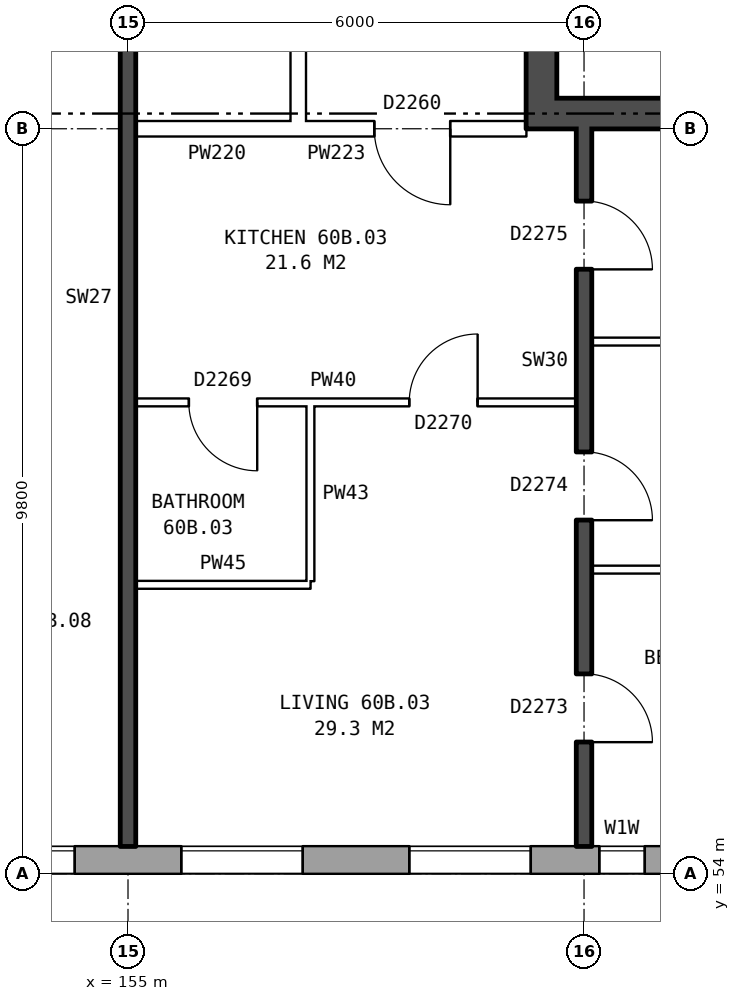
"""IFC4 building model, lengths in metres.
Left out: names, types, materials, properties, quantities, classifications, styles, units other than length and angle.
Written with IfcOpenShell. Run it as: python <this file> out.ifc"""

import sys

from ifc_helpers import new_model, si_unit, direction, frame, frame_2d, origin, place, context, subcontext, project, spatial, rectangle, extrude, element, fill, save


model = new_model("IFC4")
c1 = context("Model", 3, precision=1e-05, world=origin(), true_north=direction((0.0, 1.0)))
c2 = subcontext(c1, "Body", "Model", "MODEL_VIEW")
j1 = project(units=[si_unit("LENGTHUNIT", "METRE"), si_unit("PLANEANGLEUNIT", "RADIAN")], contexts=[c1])
p1 = place(None, origin())
s1 = spatial("IfcSite", under=j1, at=p1, CompositionType="ELEMENT")
p2 = place(p1, origin())
s2 = spatial("IfcBuilding", under=s1, at=p2, CompositionType="ELEMENT")
p3 = place(p2, frame((0.0, 0.0, 212.1)))
s3 = spatial("IfcBuildingStorey", under=s2, at=p3, CompositionType="ELEMENT", Elevation=212.1)
p4 = place(p3, frame((132.05, 54.18, 0.0), z_axis=(0.0, 0.0, 1.0), x_axis=(1.0, 0.0, 0.0)))
e1 = element("IfcWall", 1, at=p4, inside=s3, PredefinedType="STANDARD", context=c2, shape_type="SweptSolid", body=[
    extrude(rectangle(XDim=33.875, YDim=0.36, at=frame_2d((16.938, 0.0))), origin(), (0.0, 0.0, 1.0), 2.85),
])
p5 = place(p4, frame((2.65, 0.0, 0.8)))
e2 = element("IfcOpeningElement", 2, at=p5, cuts=e1, PredefinedType="OPENING", context=c2, shape_type="SweptSolid", body=[
    extrude(rectangle(XDim=1.6, YDim=1.8, at=frame_2d((0.8, 0.9))), frame((0.0, 0.19, 0.0), z_axis=(0.0, -1.0, 0.0), x_axis=(1.0, 0.0, 0.0)), (0.0, 0.0, 1.0), 0.38),
])
p6 = place(p4, frame((6.6, 0.0, 0.8)))
e3 = element("IfcOpeningElement", 3, at=p6, cuts=e1, PredefinedType="OPENING", context=c2, shape_type="SweptSolid", body=[
    extrude(rectangle(XDim=1.6, YDim=1.8, at=frame_2d((0.8, 0.9))), frame((0.0, 0.19, 0.0), z_axis=(0.0, -1.0, 0.0), x_axis=(1.0, 0.0, 0.0)), (0.0, 0.0, 1.0), 0.38),
])
p7 = place(p4, frame((8.65, 0.0, 0.8)))
e4 = element("IfcOpeningElement", 4, at=p7, cuts=e1, PredefinedType="OPENING", context=c2, shape_type="SweptSolid", body=[
    extrude(rectangle(XDim=1.6, YDim=1.8, at=frame_2d((0.8, 0.9))), frame((0.0, 0.19, 0.0), z_axis=(0.0, -1.0, 0.0), x_axis=(1.0, 0.0, 0.0)), (0.0, 0.0, 1.0), 0.38),
])
p8 = place(p4, frame((11.65, 0.0, 0.8)))
e5 = element("IfcOpeningElement", 5, at=p8, cuts=e1, PredefinedType="OPENING", context=c2, shape_type="SweptSolid", body=[
    extrude(rectangle(XDim=1.6, YDim=1.8, at=frame_2d((0.8, 0.9))), frame((0.0, 0.19, 0.0), z_axis=(0.0, -1.0, 0.0), x_axis=(1.0, 0.0, 0.0)), (0.0, 0.0, 1.0), 0.38),
])
p9 = place(p4, frame((14.65, 0.0, 0.8)))
e6 = element("IfcOpeningElement", 6, at=p9, cuts=e1, PredefinedType="OPENING", context=c2, shape_type="SweptSolid", body=[
    extrude(rectangle(XDim=1.6, YDim=1.8, at=frame_2d((0.8, 0.9))), frame((0.0, 0.19, 0.0), z_axis=(0.0, -1.0, 0.0), x_axis=(1.0, 0.0, 0.0)), (0.0, 0.0, 1.0), 0.38),
])
p10 = place(p4, frame((17.65, 0.0, 0.8)))
e7 = element("IfcOpeningElement", 7, at=p10, cuts=e1, PredefinedType="OPENING", context=c2, shape_type="SweptSolid", body=[
    extrude(rectangle(XDim=1.6, YDim=1.8, at=frame_2d((0.8, 0.9))), frame((0.0, 0.19, 0.0), z_axis=(0.0, -1.0, 0.0), x_axis=(1.0, 0.0, 0.0)), (0.0, 0.0, 1.0), 0.38),
])
p11 = place(p4, frame((20.65, 0.0, 0.8)))
e8 = element("IfcOpeningElement", 8, at=p11, cuts=e1, PredefinedType="OPENING", context=c2, shape_type="SweptSolid", body=[
    extrude(rectangle(XDim=1.6, YDim=1.8, at=frame_2d((0.8, 0.9))), frame((0.0, 0.19, 0.0), z_axis=(0.0, -1.0, 0.0), x_axis=(1.0, 0.0, 0.0)), (0.0, 0.0, 1.0), 0.38),
])
p12 = place(p4, frame((23.65, 0.0, 0.8)))
e9 = element("IfcOpeningElement", 9, at=p12, cuts=e1, PredefinedType="OPENING", context=c2, shape_type="SweptSolid", body=[
    extrude(rectangle(XDim=1.6, YDim=1.8, at=frame_2d((0.8, 0.9))), frame((0.0, 0.19, 0.0), z_axis=(0.0, -1.0, 0.0), x_axis=(1.0, 0.0, 0.0)), (0.0, 0.0, 1.0), 0.38),
])
p13 = place(p4, frame((26.65, 0.0, 0.8)))
e10 = element("IfcOpeningElement", 10, at=p13, cuts=e1, PredefinedType="OPENING", context=c2, shape_type="SweptSolid", body=[
    extrude(rectangle(XDim=1.6, YDim=1.8, at=frame_2d((0.8, 0.9))), frame((0.0, 0.19, 0.0), z_axis=(0.0, -1.0, 0.0), x_axis=(1.0, 0.0, 0.0)), (0.0, 0.0, 1.0), 0.38),
])
p14 = place(p4, frame((29.15, 0.0, 0.8)))
e11 = element("IfcOpeningElement", 11, at=p14, cuts=e1, PredefinedType="OPENING", context=c2, shape_type="SweptSolid", body=[
    extrude(rectangle(XDim=0.6, YDim=0.9, at=frame_2d((0.3, 0.45))), frame((0.0, 0.19, 0.0), z_axis=(0.0, -1.0, 0.0), x_axis=(1.0, 0.0, 0.0)), (0.0, 0.0, 1.0), 0.38),
])
p15 = place(p4, frame((31.25, 0.0, 1.1)))
e12 = element("IfcOpeningElement", 12, at=p15, cuts=e1, PredefinedType="OPENING", context=c2, shape_type="SweptSolid", body=[
    extrude(rectangle(XDim=1.4, YDim=1.5, at=frame_2d((0.7, 0.75))), frame((0.0, 0.19, 0.0), z_axis=(0.0, -1.0, 0.0), x_axis=(1.0, 0.0, 0.0)), (0.0, 0.0, 1.0), 0.38),
])
p16 = place(p4, frame((32.95, 0.0, 0.8)))
e13 = element("IfcOpeningElement", 13, at=p16, cuts=e1, PredefinedType="OPENING", context=c2, shape_type="SweptSolid", body=[
    extrude(rectangle(XDim=0.6, YDim=1.8, at=frame_2d((0.3, 0.9))), frame((0.0, 0.19, 0.0), z_axis=(0.0, -1.0, 0.0), x_axis=(1.0, 0.0, 0.0)), (0.0, 0.0, 1.0), 0.38),
])
p17 = place(p3, frame((160.44, 76.2, 0.0), z_axis=(0.0, 0.0, 1.0), x_axis=(0.0, -1.0, 0.0)))
e14 = element("IfcWall", 14, at=p17, inside=s3, PredefinedType="SHEAR", context=c2, shape_type="SweptSolid", body=[
    extrude(rectangle(XDim=12.4, YDim=0.4, at=frame_2d((6.2, 0.0))), origin(), (0.0, 0.0, 1.0), 2.85),
])
p18 = place(p17, frame((1.325, 0.0, 0.0)))
e15 = element("IfcOpeningElement", 15, at=p18, cuts=e14, PredefinedType="OPENING", context=c2, shape_type="SweptSolid", body=[
    extrude(rectangle(XDim=1.1, YDim=2.1, at=frame_2d((0.55, 1.05))), frame((0.0, 0.21, 0.0), z_axis=(0.0, -1.0, 0.0), x_axis=(1.0, 0.0, 0.0)), (0.0, 0.0, 1.0), 0.42),
])
p19 = place(p17, frame((3.825, 0.0, 0.0)))
e16 = element("IfcOpeningElement", 16, at=p19, cuts=e14, PredefinedType="OPENING", context=c2, shape_type="SweptSolid", body=[
    extrude(rectangle(XDim=0.85, YDim=2.1, at=frame_2d((0.425, 1.05))), frame((0.0, 0.21, 0.0), z_axis=(0.0, -1.0, 0.0), x_axis=(1.0, 0.0, 0.0)), (0.0, 0.0, 1.0), 0.42),
])
p20 = place(p17, frame((5.975, 0.0, 0.0)))
e17 = element("IfcOpeningElement", 17, at=p20, cuts=e14, PredefinedType="OPENING", context=c2, shape_type="SweptSolid", body=[
    extrude(rectangle(XDim=0.85, YDim=2.1, at=frame_2d((0.425, 1.05))), frame((0.0, 0.21, 0.0), z_axis=(0.0, -1.0, 0.0), x_axis=(1.0, 0.0, 0.0)), (0.0, 0.0, 1.0), 0.42),
])
p21 = place(p17, frame((9.9, 0.0, 0.0)))
e18 = element("IfcOpeningElement", 18, at=p21, cuts=e14, PredefinedType="OPENING", context=c2, shape_type="SweptSolid", body=[
    extrude(rectangle(XDim=1.1, YDim=2.1, at=frame_2d((0.55, 1.05))), frame((0.0, 0.21, 0.0), z_axis=(0.0, -1.0, 0.0), x_axis=(1.0, 0.0, 0.0)), (0.0, 0.0, 1.0), 0.42),
])
p22 = place(p17, frame((8.125, 0.0, 0.0)))
e19 = element("IfcOpeningElement", 19, at=p22, cuts=e14, PredefinedType="OPENING", context=c2, shape_type="SweptSolid", body=[
    extrude(rectangle(XDim=0.85, YDim=2.1, at=frame_2d((0.425, 1.05))), frame((0.0, 0.21, 0.0), z_axis=(0.0, -1.0, 0.0), x_axis=(1.0, 0.0, 0.0)), (0.0, 0.0, 1.0), 0.42),
])
p23 = place(p3, frame((160.64, 64.0, 0.0), z_axis=(0.0, 0.0, 1.0), x_axis=(1.0, 0.0, 0.0)))
e20 = element("IfcWall", 20, at=p23, inside=s3, PredefinedType="SHEAR", context=c2, shape_type="SweptSolid", body=[
    extrude(rectangle(XDim=7.6, YDim=0.4, at=frame_2d((3.8, 0.0))), origin(), (0.0, 0.0, 1.0), 2.85),
])
p24 = place(p3, frame((157.24, 63.9, 0.0), z_axis=(0.0, 0.0, 1.0), x_axis=(0.0, 1.0, 0.0)))
e21 = element("IfcWall", 21, at=p24, inside=s3, PredefinedType="PARTITIONING", context=c2, shape_type="SweptSolid", body=[
    extrude(rectangle(XDim=12.2, YDim=0.2, at=frame_2d((6.1, 0.0))), origin(), (0.0, 0.0, 1.0), 2.85),
])
p25 = place(p24, frame((5.1, 0.0, 0.0)))
e22 = element("IfcOpeningElement", 22, at=p25, cuts=e21, PredefinedType="OPENING", context=c2, shape_type="SweptSolid", body=[
    extrude(rectangle(XDim=2.0, YDim=2.1, at=frame_2d((1.0, 1.05))), frame((0.0, 0.11, 0.0), z_axis=(0.0, -1.0, 0.0), x_axis=(1.0, 0.0, 0.0)), (0.0, 0.0, 1.0), 0.22),
])
p26 = place(p3, frame((155.1, 57.8, 0.0), z_axis=(0.0, 0.0, 1.0), x_axis=(1.0, 0.0, 0.0)))
e23 = element("IfcWall", 23, at=p26, inside=s3, PredefinedType="PARTITIONING", context=c2, shape_type="SweptSolid", body=[
    extrude(rectangle(XDim=2.3, YDim=0.1, at=frame_2d((1.15, 0.0))), origin(), (0.0, 0.0, 1.0), 2.85),
])
p27 = place(p3, frame((161.1, 58.0, 0.0), z_axis=(0.0, 0.0, 1.0), x_axis=(1.0, 0.0, 0.0)))
e24 = element("IfcWall", 24, at=p27, inside=s3, PredefinedType="PARTITIONING", context=c2, shape_type="SweptSolid", body=[
    extrude(rectangle(XDim=7.54, YDim=0.1, at=frame_2d((3.77, 0.0))), origin(), (0.0, 0.0, 1.0), 2.85),
])
p28 = place(p3, frame((155.1, 60.2, 0.0), z_axis=(0.0, 0.0, 1.0), x_axis=(1.0, 0.0, 0.0)))
e25 = element("IfcWall", 25, at=p28, inside=s3, PredefinedType="PARTITIONING", context=c2, shape_type="SweptSolid", body=[
    extrude(rectangle(XDim=5.8, YDim=0.1, at=frame_2d((2.9, 0.0))), origin(), (0.0, 0.0, 1.0), 2.85),
])
p29 = place(p28, frame((3.6, 0.0, 0.0)))
e26 = element("IfcOpeningElement", 26, at=p29, cuts=e25, PredefinedType="OPENING", context=c2, shape_type="SweptSolid", body=[
    extrude(rectangle(XDim=0.9, YDim=2.1, at=frame_2d((0.45, 1.05))), frame((0.0, 0.06, 0.0), z_axis=(0.0, -1.0, 0.0), x_axis=(1.0, 0.0, 0.0)), (0.0, 0.0, 1.0), 0.12),
])
p30 = place(p28, frame((0.7, 0.0, 0.0)))
e27 = element("IfcOpeningElement", 27, at=p30, cuts=e25, PredefinedType="OPENING", context=c2, shape_type="SweptSolid", body=[
    extrude(rectangle(XDim=0.9, YDim=2.1, at=frame_2d((0.45, 1.05))), frame((0.0, 0.06, 0.0), z_axis=(0.0, -1.0, 0.0), x_axis=(1.0, 0.0, 0.0)), (0.0, 0.0, 1.0), 0.12),
])
p31 = place(p3, frame((161.1, 61.0, 0.0), z_axis=(0.0, 0.0, 1.0), x_axis=(1.0, 0.0, 0.0)))
e28 = element("IfcWall", 28, at=p31, inside=s3, PredefinedType="PARTITIONING", context=c2, shape_type="SweptSolid", body=[
    extrude(rectangle(XDim=7.54, YDim=0.1, at=frame_2d((3.77, 0.0))), origin(), (0.0, 0.0, 1.0), 2.85),
])
p32 = place(p3, frame((155.1, 63.8, 0.0), z_axis=(0.0, 0.0, 1.0), x_axis=(1.0, 0.0, 0.0)))
e29 = element("IfcWall", 29, at=p32, inside=s3, PredefinedType="PARTITIONING", context=c2, shape_type="SweptSolid", body=[
    extrude(rectangle(XDim=2.14, YDim=0.2, at=frame_2d((1.07, 0.0))), origin(), (0.0, 0.0, 1.0), 2.85),
])
p33 = place(p3, frame((157.24, 63.8, 0.0), z_axis=(0.0, 0.0, 1.0), x_axis=(1.0, 0.0, 0.0)))
e30 = element("IfcWall", 30, at=p33, inside=s3, PredefinedType="PARTITIONING", context=c2, shape_type="SweptSolid", body=[
    extrude(rectangle(XDim=3.0, YDim=0.2, at=frame_2d((1.5, 0.0))), origin(), (0.0, 0.0, 1.0), 2.85),
])
p34 = place(p33, frame((1.0, 0.0, 0.0)))
e31 = element("IfcOpeningElement", 31, at=p34, cuts=e30, PredefinedType="OPENING", context=c2, shape_type="SweptSolid", body=[
    extrude(rectangle(XDim=1.0, YDim=2.1, at=frame_2d((0.5, 1.05))), frame((0.0, 0.11, 0.0), z_axis=(0.0, -1.0, 0.0), x_axis=(1.0, 0.0, 0.0)), (0.0, 0.0, 1.0), 0.22),
])
p35 = place(p3, frame((155.0, 54.36, 0.0), z_axis=(0.0, 0.0, 1.0), x_axis=(0.0, 1.0, 0.0)))
e32 = element("IfcWall", 32, at=p35, inside=s3, PredefinedType="SOLIDWALL", context=c2, shape_type="SweptSolid", body=[
    extrude(rectangle(XDim=14.44, YDim=0.2, at=frame_2d((7.22, 0.0))), origin(), (0.0, 0.0, 1.0), 2.85),
])
p36 = place(p3, frame((157.4, 57.85, 0.0), z_axis=(0.0, 0.0, 1.0), x_axis=(0.0, 1.0, 0.0)))
e33 = element("IfcWall", 33, at=p36, inside=s3, PredefinedType="PARTITIONING", context=c2, shape_type="SweptSolid", body=[
    extrude(rectangle(XDim=2.3, YDim=0.1, at=frame_2d((1.15, 0.0))), origin(), (0.0, 0.0, 1.0), 2.85),
])
p37 = place(p3, frame((161.0, 54.36, 0.0), z_axis=(0.0, 0.0, 1.0), x_axis=(0.0, 1.0, 0.0)))
e34 = element("IfcWall", 34, at=p37, inside=s3, PredefinedType="SOLIDWALL", context=c2, shape_type="SweptSolid", body=[
    extrude(rectangle(XDim=9.44, YDim=0.2, at=frame_2d((4.72, 0.0))), origin(), (0.0, 0.0, 1.0), 2.85),
])
p38 = place(p37, frame((1.37, 0.0, 0.0)))
e35 = element("IfcOpeningElement", 35, at=p38, cuts=e34, PredefinedType="OPENING", context=c2, shape_type="SweptSolid", body=[
    extrude(rectangle(XDim=0.9, YDim=2.1, at=frame_2d((0.45, 1.05))), frame((0.0, 0.11, 0.0), z_axis=(0.0, -1.0, 0.0), x_axis=(1.0, 0.0, 0.0)), (0.0, 0.0, 1.0), 0.22),
])
p39 = place(p37, frame((4.29, 0.0, 0.0)))
e36 = element("IfcOpeningElement", 36, at=p39, cuts=e34, PredefinedType="OPENING", context=c2, shape_type="SweptSolid", body=[
    extrude(rectangle(XDim=0.9, YDim=2.1, at=frame_2d((0.45, 1.05))), frame((0.0, 0.11, 0.0), z_axis=(0.0, -1.0, 0.0), x_axis=(1.0, 0.0, 0.0)), (0.0, 0.0, 1.0), 0.22),
])
p40 = place(p37, frame((7.59, 0.0, 0.0)))
e37 = element("IfcOpeningElement", 37, at=p40, cuts=e34, PredefinedType="OPENING", context=c2, shape_type="SweptSolid", body=[
    extrude(rectangle(XDim=0.9, YDim=2.1, at=frame_2d((0.45, 1.05))), frame((0.0, 0.11, 0.0), z_axis=(0.0, -1.0, 0.0), x_axis=(1.0, 0.0, 0.0)), (0.0, 0.0, 1.0), 0.22),
])
p41 = place(p11, origin())
e38 = element("IfcWindow", 38, at=p41, inside=s3, PartitioningType="SINGLE_PANEL", PredefinedType="WINDOW", context=c2, shape_type="SweptSolid", body=[
    extrude(rectangle(XDim=1.6, YDim=1.8, at=frame_2d((0.8, 0.9))), frame((0.0, 0.15, 0.0), z_axis=(0.0, -1.0, 0.0), x_axis=(1.0, 0.0, 0.0)), (0.0, 0.0, 1.0), 0.06),
])
fill(e8, e38)
p42 = place(p12, origin())
e39 = element("IfcWindow", 39, at=p42, inside=s3, PartitioningType="SINGLE_PANEL", PredefinedType="WINDOW", context=c2, shape_type="SweptSolid", body=[
    extrude(rectangle(XDim=1.6, YDim=1.8, at=frame_2d((0.8, 0.9))), frame((0.0, 0.15, 0.0), z_axis=(0.0, -1.0, 0.0), x_axis=(1.0, 0.0, 0.0)), (0.0, 0.0, 1.0), 0.06),
])
fill(e9, e39)
p43 = place(p13, origin())
e40 = element("IfcWindow", 40, at=p43, inside=s3, PartitioningType="SINGLE_PANEL", PredefinedType="WINDOW", context=c2, shape_type="SweptSolid", body=[
    extrude(rectangle(XDim=1.6, YDim=1.8, at=frame_2d((0.8, 0.9))), frame((0.0, 0.15, 0.0), z_axis=(0.0, -1.0, 0.0), x_axis=(1.0, 0.0, 0.0)), (0.0, 0.0, 1.0), 0.06),
])
fill(e10, e40)
p44 = place(p14, origin())
e41 = element("IfcWindow", 41, at=p44, inside=s3, PartitioningType="SINGLE_PANEL", PredefinedType="WINDOW", context=c2, shape_type="SweptSolid", body=[
    extrude(rectangle(XDim=0.6, YDim=0.9, at=frame_2d((0.3, 0.45))), frame((0.0, 0.15, 0.0), z_axis=(0.0, -1.0, 0.0), x_axis=(1.0, 0.0, 0.0)), (0.0, 0.0, 1.0), 0.06),
])
fill(e11, e41)
p45 = place(p38, frame((0.9, 0.0, 0.0), z_axis=(0.0, 0.0, 1.0), x_axis=(-1.0, 0.0, 0.0)))
e42 = element("IfcDoor", 42, at=p45, inside=s3, OperationType="SINGLE_SWING_RIGHT", PredefinedType="DOOR", context=c2, shape_type="SweptSolid", body=[
    extrude(rectangle(XDim=0.9, YDim=2.1, at=frame_2d((0.45, 1.05))), frame((0.0, 0.025, 0.0), z_axis=(0.0, -1.0, 0.0), x_axis=(1.0, 0.0, 0.0)), (0.0, 0.0, 1.0), 0.05),
])
fill(e35, e42)
p46 = place(p39, frame((0.9, 0.0, 0.0), z_axis=(0.0, 0.0, 1.0), x_axis=(-1.0, 0.0, 0.0)))
e43 = element("IfcDoor", 43, at=p46, inside=s3, OperationType="SINGLE_SWING_RIGHT", PredefinedType="DOOR", context=c2, shape_type="SweptSolid", body=[
    extrude(rectangle(XDim=0.9, YDim=2.1, at=frame_2d((0.45, 1.05))), frame((0.0, 0.025, 0.0), z_axis=(0.0, -1.0, 0.0), x_axis=(1.0, 0.0, 0.0)), (0.0, 0.0, 1.0), 0.05),
])
fill(e36, e43)
p47 = place(p40, frame((0.9, 0.0, 0.0), z_axis=(0.0, 0.0, 1.0), x_axis=(-1.0, 0.0, 0.0)))
e44 = element("IfcDoor", 44, at=p47, inside=s3, OperationType="SINGLE_SWING_RIGHT", PredefinedType="DOOR", context=c2, shape_type="SweptSolid", body=[
    extrude(rectangle(XDim=0.9, YDim=2.1, at=frame_2d((0.45, 1.05))), frame((0.0, 0.025, 0.0), z_axis=(0.0, -1.0, 0.0), x_axis=(1.0, 0.0, 0.0)), (0.0, 0.0, 1.0), 0.05),
])
fill(e37, e44)
p48 = place(p34, frame((1.0, 0.0, 0.0), z_axis=(0.0, 0.0, 1.0), x_axis=(-1.0, 0.0, 0.0)))
e45 = element("IfcDoor", 45, at=p48, inside=s3, OperationType="SINGLE_SWING_LEFT", PredefinedType="DOOR", context=c2, shape_type="SweptSolid", body=[
    extrude(rectangle(XDim=1.0, YDim=2.1, at=frame_2d((0.5, 1.05))), frame((0.0, 0.025, 0.0), z_axis=(0.0, -1.0, 0.0), x_axis=(1.0, 0.0, 0.0)), (0.0, 0.0, 1.0), 0.05),
])
fill(e31, e45)
p49 = place(p29, origin())
e46 = element("IfcDoor", 46, at=p49, inside=s3, OperationType="SINGLE_SWING_RIGHT", PredefinedType="DOOR", context=c2, shape_type="SweptSolid", body=[
    extrude(rectangle(XDim=0.9, YDim=2.1, at=frame_2d((0.45, 1.05))), frame((0.0, 0.025, 0.0), z_axis=(0.0, -1.0, 0.0), x_axis=(1.0, 0.0, 0.0)), (0.0, 0.0, 1.0), 0.05),
])
fill(e26, e46)
p50 = place(p30, frame((0.9, 0.0, 0.0), z_axis=(0.0, 0.0, 1.0), x_axis=(-1.0, 0.0, 0.0)))
e47 = element("IfcDoor", 47, at=p50, inside=s3, OperationType="SINGLE_SWING_LEFT", PredefinedType="DOOR", context=c2, shape_type="SweptSolid", body=[
    extrude(rectangle(XDim=0.9, YDim=2.1, at=frame_2d((0.45, 1.05))), frame((0.0, 0.025, 0.0), z_axis=(0.0, -1.0, 0.0), x_axis=(1.0, 0.0, 0.0)), (0.0, 0.0, 1.0), 0.05),
])
fill(e27, e47)
save(model, sys.argv[1])
